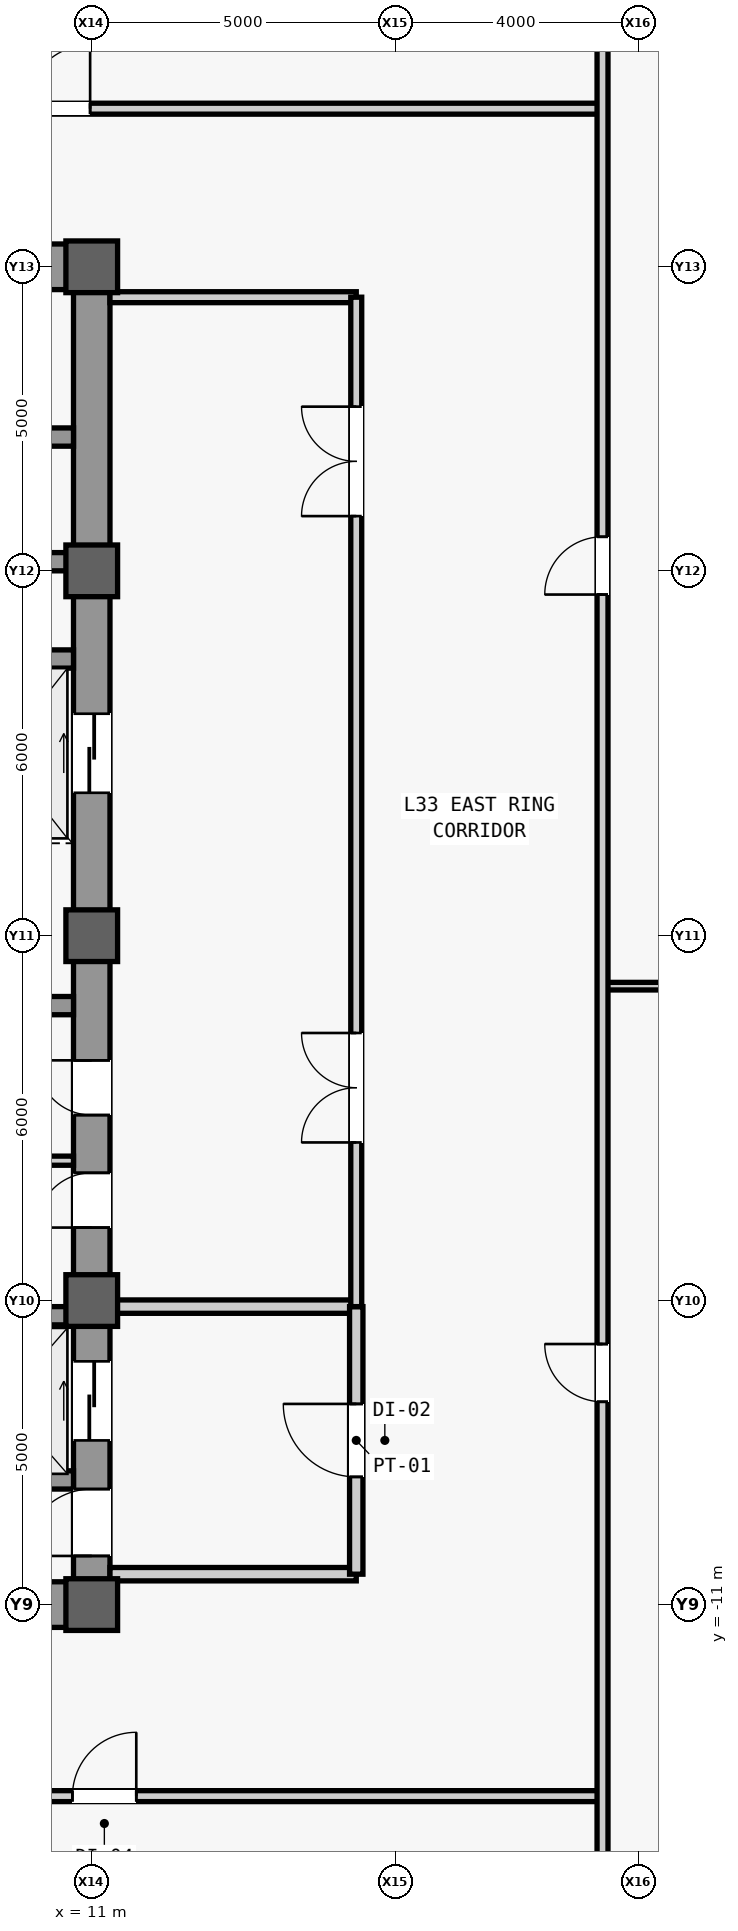
"""IFC4 building model, lengths in metres.
Left out: names, types, materials, properties, quantities, classifications, styles, units other than length and angle.
Written with IfcOpenShell. Run it as: python <this file> out.ifc"""

import sys

from ifc_helpers import new_model, si_unit, direction, frame, frame_2d, origin, origin_2d, place, context, subcontext, project, spatial, rectangle, extrude, source, transform, mapped, element, fill, save


model = new_model("IFC4")
c1 = context("Model", 3, precision=1e-05, world=origin(), true_north=direction((0.0, 1.0)))
c2 = subcontext(c1, "Body", "Model", "MODEL_VIEW")
j1 = project(units=[si_unit("LENGTHUNIT", "METRE"), si_unit("PLANEANGLEUNIT", "RADIAN")], contexts=[c1])
p1 = place(None, origin())
s1 = spatial("IfcSite", under=j1, at=p1, CompositionType="ELEMENT")
p2 = place(p1, origin())
s2 = spatial("IfcBuilding", under=s1, at=p2, CompositionType="ELEMENT")
p3 = place(p2, frame((0.0, 0.0, 144.7)))
s3 = spatial("IfcBuildingStorey", under=s2, at=p3, CompositionType="ELEMENT", Elevation=144.7)
m1 = source(origin(), c2, "Body", "SweptSolid", [
    extrude(rectangle(XDim=22.0, YDim=0.6, at=frame_2d((11.0, 0.0))), origin(), (0.0, 0.0, 1.0), 4.6),
])
p4 = place(p3, frame((11.0, -11.0, 0.0), z_axis=(0.0, 0.0, 1.0), x_axis=(0.0, 1.0, 0.0)))
e1 = element("IfcWall", 1, at=p4, inside=s3, PredefinedType="SHEAR", context=c2, shape_type="MappedRepresentation", body=[
    mapped(m1, transform((0.0, 0.0, 0.0), scale=1.0)),
])
m2 = source(origin(), c2, "Body", "SweptSolid", [
    extrude(rectangle(XDim=1.1, YDim=2.2, at=frame_2d((0.55, 1.1))), frame((0.0, 0.31, 0.0), z_axis=(0.0, -1.0, 0.0), x_axis=(1.0, 0.0, 0.0)), (0.0, 0.0, 1.0), 0.62),
])
p5 = place(p4, frame((0.8, 0.0, 0.0)))
e2 = element("IfcOpeningElement", 2, at=p5, cuts=e1, PredefinedType="OPENING", context=c2, shape_type="MappedRepresentation", body=[
    mapped(m2, transform((0.0, 0.0, 0.0), scale=1.0)),
])
m3 = source(origin(), c2, "Body", "SweptSolid", [
    extrude(rectangle(XDim=0.9, YDim=2.15, at=frame_2d((0.45, 1.075))), frame((0.0, 0.31, 0.0), z_axis=(0.0, -1.0, 0.0), x_axis=(1.0, 0.0, 0.0)), (0.0, 0.0, 1.0), 0.62),
])
p6 = place(p4, frame((6.2, 0.0, 0.0)))
e3 = element("IfcOpeningElement", 3, at=p6, cuts=e1, PredefinedType="OPENING", context=c2, shape_type="MappedRepresentation", body=[
    mapped(m3, transform((0.0, 0.0, 0.0), scale=1.0)),
])
p7 = place(p4, frame((8.05, 0.0, 0.0)))
e4 = element("IfcOpeningElement", 4, at=p7, cuts=e1, PredefinedType="OPENING", context=c2, shape_type="MappedRepresentation", body=[
    mapped(m3, transform((0.0, 0.0, 0.0), scale=1.0)),
])
m4 = source(origin(), c2, "Body", "SweptSolid", [
    extrude(rectangle(XDim=1.3, YDim=2.3, at=frame_2d((0.65, 1.15))), frame((0.0, 0.31, 0.0), z_axis=(0.0, -1.0, 0.0), x_axis=(1.0, 0.0, 0.0)), (0.0, 0.0, 1.0), 0.62),
])
p8 = place(p4, frame((2.7, 0.0, 0.0)))
e5 = element("IfcOpeningElement", 5, at=p8, cuts=e1, PredefinedType="OPENING", context=c2, shape_type="MappedRepresentation", body=[
    mapped(m4, transform((0.0, 0.0, 0.0), scale=1.0)),
])
p9 = place(p4, frame((13.35, 0.0, 0.0)))
e6 = element("IfcOpeningElement", 6, at=p9, cuts=e1, PredefinedType="OPENING", context=c2, shape_type="MappedRepresentation", body=[
    mapped(m4, transform((0.0, 0.0, 0.0), scale=1.0)),
])
m5 = source(origin(), c2, "Body", "SweptSolid", [
    extrude(rectangle(XDim=5.85, YDim=0.75, at=frame_2d((2.925, 0.0))), origin(), (0.0, 0.0, 1.0), 4.6),
])
p10 = place(p3, frame((4.85, -11.0, 0.0), z_axis=(0.0, 0.0, 1.0), x_axis=(1.0, 0.0, 0.0)))
e7 = element("IfcWall", 7, at=p10, inside=s3, PredefinedType="SHEAR", context=c2, shape_type="MappedRepresentation", body=[
    mapped(m5, transform((0.0, 0.0, 0.0), scale=1.0)),
])
p11 = place(p3, frame((4.85, 11.0, 0.0), z_axis=(0.0, 0.0, 1.0), x_axis=(1.0, 0.0, 0.0)))
e8 = element("IfcWall", 8, at=p11, inside=s3, PredefinedType="SHEAR", context=c2, shape_type="MappedRepresentation", body=[
    mapped(m5, transform((0.0, 0.0, 0.0), scale=1.0)),
])
m6 = source(origin(), c2, "Body", "SweptSolid", [
    extrude(rectangle(XDim=1.05, YDim=2.2, at=frame_2d((0.525, 1.1))), frame((0.0, 0.385, 0.0), z_axis=(0.0, -1.0, 0.0), x_axis=(1.0, 0.0, 0.0)), (0.0, 0.0, 1.0), 0.77),
])
p12 = place(p11, frame((1.375, 0.0, 0.0)))
e9 = element("IfcOpeningElement", 9, at=p12, cuts=e8, PredefinedType="OPENING", context=c2, shape_type="MappedRepresentation", body=[
    mapped(m6, transform((0.0, 0.0, 0.0), scale=1.0)),
])
m7 = source(origin(), c2, "Body", "SweptSolid", [
    extrude(rectangle(XDim=5.6, YDim=0.3, at=frame_2d((2.8, 0.0))), origin(), (0.0, 0.0, 1.0), 4.6),
])
p13 = place(p3, frame((5.1, -1.15, 0.0), z_axis=(0.0, 0.0, 1.0), x_axis=(1.0, 0.0, 0.0)))
e10 = element("IfcWall", 10, at=p13, inside=s3, PredefinedType="SHEAR", context=c2, shape_type="MappedRepresentation", body=[
    mapped(m7, transform((0.0, 0.0, 0.0), scale=1.0)),
])
m8 = source(origin(), c2, "Body", "SweptSolid", [
    extrude(rectangle(XDim=0.85, YDim=0.85, at=origin_2d()), origin(), (0.0, 0.0, 1.0), 5.2),
])
for number, where, z_axis, x_axis in (
    (11, (11.0, -11.0, 0.0), (0.0, 0.0, 1.0), (1.0, 0.0, 0.0)),
    (12, (11.0, -6.0, 0.0), (0.0, 0.0, 1.0), (1.0, 0.0, 0.0)),
    (13, (11.0, 0.0, 0.0), (0.0, 0.0, 1.0), (1.0, 0.0, 0.0)),
    (14, (11.0, 6.0, 0.0), (0.0, 0.0, 1.0), (1.0, 0.0, 0.0)),
    (15, (11.0, 11.0, 0.0), (0.0, 0.0, 1.0), (1.0, 0.0, 0.0)),
):
    element("IfcColumn", number, at=place(p3, frame(where, z_axis=z_axis, x_axis=x_axis)), inside=s3, PredefinedType="COLUMN", context=c2, shape_type="MappedRepresentation", body=[
        mapped(m8, transform((0.0, 0.0, 0.0), scale=1.0)),
    ])
m9 = source(origin(), c2, "Body", "SweptSolid", [
    extrude(rectangle(XDim=2.2, YDim=0.3, at=frame_2d((1.1, 0.0))), origin(), (0.0, 0.0, 1.0), 4.6),
])
for number, where, z_axis, x_axis in (
    (16, (8.5, -8.95, 0.0), (0.0, 0.0, 1.0), (1.0, 0.0, 0.0)),
    (17, (8.5, -6.25, 0.0), (0.0, 0.0, 1.0), (1.0, 0.0, 0.0)),
):
    element("IfcWall", number, at=place(p3, frame(where, z_axis=z_axis, x_axis=x_axis)), inside=s3, PredefinedType="SHEAR", context=c2, shape_type="MappedRepresentation", body=[
        mapped(m9, transform((0.0, 0.0, 0.0), scale=1.0)),
    ])
m10 = source(origin(), c2, "Body", "SweptSolid", [
    extrude(rectangle(XDim=2.3, YDim=0.3, at=frame_2d((1.15, 0.0))), origin(), (0.0, 0.0, 1.0), 4.6),
])
for number, where, z_axis, x_axis in (
    (18, (8.4, 4.55, 0.0), (0.0, 0.0, 1.0), (1.0, 0.0, 0.0)),
    (19, (8.4, 6.15, 0.0), (0.0, 0.0, 1.0), (1.0, 0.0, 0.0)),
    (20, (8.4, 8.2, 0.0), (0.0, 0.0, 1.0), (1.0, 0.0, 0.0)),
):
    element("IfcWall", number, at=place(p3, frame(where, z_axis=z_axis, x_axis=x_axis)), inside=s3, PredefinedType="SHEAR", context=c2, shape_type="MappedRepresentation", body=[
        mapped(m10, transform((0.0, 0.0, 0.0), scale=1.0)),
    ])
m11 = source(origin(), c2, "Body", "SweptSolid", [
    extrude(rectangle(XDim=2.05, YDim=0.15, at=frame_2d((1.025, 0.0))), origin(), (0.0, 0.0, 1.0), 4.6),
])
p14 = place(p3, frame((8.65, -3.7, 0.0), z_axis=(0.0, 0.0, 1.0), x_axis=(1.0, 0.0, 0.0)))
e21 = element("IfcWall", 21, at=p14, inside=s3, PredefinedType="PARTITIONING", context=c2, shape_type="MappedRepresentation", body=[
    mapped(m11, transform((0.0, 0.0, 0.0), scale=1.0)),
])
m12 = source(origin(), c2, "Body", "SweptSolid", [
    extrude(rectangle(XDim=4.05, YDim=0.22, at=frame_2d((2.025, 0.0))), origin(), (0.0, 0.0, 1.0), 4.6),
])
p15 = place(p3, frame((11.3, -10.5, 0.0), z_axis=(0.0, 0.0, 1.0), x_axis=(1.0, 0.0, 0.0)))
e22 = element("IfcWall", 22, at=p15, inside=s3, PredefinedType="PARTITIONING", context=c2, shape_type="MappedRepresentation", body=[
    mapped(m12, transform((0.0, 0.0, 0.0), scale=1.0)),
])
m13 = source(origin(), c2, "Body", "SweptSolid", [
    extrude(rectangle(XDim=4.05, YDim=0.22, at=frame_2d((2.025, 0.0))), origin(), (0.0, 0.0, 1.0), 2.8),
])
p16 = place(p3, frame((11.3, -6.1, 0.0), z_axis=(0.0, 0.0, 1.0), x_axis=(1.0, 0.0, 0.0)))
e23 = element("IfcWall", 23, at=p16, inside=s3, PredefinedType="PARTITIONING", context=c2, shape_type="MappedRepresentation", body=[
    mapped(m13, transform((0.0, 0.0, 0.0), scale=1.0)),
])
m14 = source(origin(), c2, "Body", "SweptSolid", [
    extrude(rectangle(XDim=4.4, YDim=0.22, at=frame_2d((2.2, 0.0))), origin(), (0.0, 0.0, 1.0), 4.6),
])
p17 = place(p3, frame((15.35, -10.5, 0.0), z_axis=(0.0, 0.0, 1.0), x_axis=(0.0, 1.0, 0.0)))
e24 = element("IfcWall", 24, at=p17, inside=s3, PredefinedType="PARTITIONING", context=c2, shape_type="MappedRepresentation", body=[
    mapped(m14, transform((0.0, 0.0, 0.0), scale=1.0)),
])
m15 = source(origin(), c2, "Body", "SweptSolid", [
    extrude(rectangle(XDim=1.2, YDim=2.2, at=frame_2d((0.6, 1.1))), frame((0.0, 0.12, 0.0), z_axis=(0.0, -1.0, 0.0), x_axis=(1.0, 0.0, 0.0)), (0.0, 0.0, 1.0), 0.24),
])
p18 = place(p17, frame((1.6, 0.0, 0.0)))
e25 = element("IfcOpeningElement", 25, at=p18, cuts=e24, PredefinedType="OPENING", context=c2, shape_type="MappedRepresentation", body=[
    mapped(m15, transform((0.0, 0.0, 0.0), scale=1.0)),
])
m16 = source(origin(), c2, "Body", "SweptSolid", [
    extrude(rectangle(XDim=4.05, YDim=0.18, at=frame_2d((2.025, 0.0))), origin(), (0.0, 0.0, 1.0), 4.6),
])
p19 = place(p3, frame((11.3, 10.5, 0.0), z_axis=(0.0, 0.0, 1.0), x_axis=(1.0, 0.0, 0.0)))
e26 = element("IfcWall", 26, at=p19, inside=s3, PredefinedType="PARTITIONING", context=c2, shape_type="MappedRepresentation", body=[
    mapped(m16, transform((0.0, 0.0, 0.0), scale=1.0)),
])
m17 = source(origin(), c2, "Body", "SweptSolid", [
    extrude(rectangle(XDim=16.6, YDim=0.18, at=frame_2d((8.3, 0.0))), origin(), (0.0, 0.0, 1.0), 4.6),
])
p20 = place(p3, frame((15.35, -6.1, 0.0), z_axis=(0.0, 0.0, 1.0), x_axis=(0.0, 1.0, 0.0)))
e27 = element("IfcWall", 27, at=p20, inside=s3, PredefinedType="PARTITIONING", context=c2, shape_type="MappedRepresentation", body=[
    mapped(m17, transform((0.0, 0.0, 0.0), scale=1.0)),
])
m18 = source(origin(), c2, "Body", "SweptSolid", [
    extrude(rectangle(XDim=1.8, YDim=2.25, at=frame_2d((0.9, 1.125))), frame((0.0, 0.1, 0.0), z_axis=(0.0, -1.0, 0.0), x_axis=(1.0, 0.0, 0.0)), (0.0, 0.0, 1.0), 0.2),
])
p21 = place(p20, frame((2.7, 0.0, 0.0)))
e28 = element("IfcOpeningElement", 28, at=p21, cuts=e27, PredefinedType="OPENING", context=c2, shape_type="MappedRepresentation", body=[
    mapped(m18, transform((0.0, 0.0, 0.0), scale=1.0)),
])
p22 = place(p20, frame((13.0, 0.0, 0.0)))
e29 = element("IfcOpeningElement", 29, at=p22, cuts=e27, PredefinedType="OPENING", context=c2, shape_type="MappedRepresentation", body=[
    mapped(m18, transform((0.0, 0.0, 0.0), scale=1.0)),
])
m19 = source(origin(), c2, "Body", "SweptSolid", [
    extrude(rectangle(XDim=37.95, YDim=0.18, at=frame_2d((18.975, 0.0))), origin(), (0.0, 0.0, 1.0), 4.6),
])
p23 = place(p3, frame((-18.55, -14.15, 0.0), z_axis=(0.0, 0.0, 1.0), x_axis=(1.0, 0.0, 0.0)))
e30 = element("IfcWall", 30, at=p23, inside=s3, PredefinedType="PARTITIONING", context=c2, shape_type="MappedRepresentation", body=[
    mapped(m19, transform((0.0, 0.0, 0.0), scale=1.0)),
])
m20 = source(origin(), c2, "Body", "SweptSolid", [
    extrude(rectangle(XDim=1.05, YDim=2.2, at=frame_2d((0.525, 1.1))), frame((0.0, 0.1, 0.0), z_axis=(0.0, -1.0, 0.0), x_axis=(1.0, 0.0, 0.0)), (0.0, 0.0, 1.0), 0.2),
])
p24 = place(p23, frame((8.191, 0.0, 0.0)))
e31 = element("IfcOpeningElement", 31, at=p24, cuts=e30, PredefinedType="OPENING", context=c2, shape_type="MappedRepresentation", body=[
    mapped(m20, transform((0.0, 0.0, 0.0), scale=1.0)),
])
p25 = place(p23, frame((19.399, 0.0, 0.0)))
e32 = element("IfcOpeningElement", 32, at=p25, cuts=e30, PredefinedType="OPENING", context=c2, shape_type="MappedRepresentation", body=[
    mapped(m20, transform((0.0, 0.0, 0.0), scale=1.0)),
])
p26 = place(p23, frame((29.232, 0.0, 0.0)))
e33 = element("IfcOpeningElement", 33, at=p26, cuts=e30, PredefinedType="OPENING", context=c2, shape_type="MappedRepresentation", body=[
    mapped(m20, transform((0.0, 0.0, 0.0), scale=1.0)),
])
p27 = place(p3, frame((-18.55, 13.6, 0.0), z_axis=(0.0, 0.0, 1.0), x_axis=(1.0, 0.0, 0.0)))
e34 = element("IfcWall", 34, at=p27, inside=s3, PredefinedType="PARTITIONING", context=c2, shape_type="MappedRepresentation", body=[
    mapped(m19, transform((0.0, 0.0, 0.0), scale=1.0)),
])
p28 = place(p27, frame((7.622, 0.0, 0.0)))
e35 = element("IfcOpeningElement", 35, at=p28, cuts=e34, PredefinedType="OPENING", context=c2, shape_type="MappedRepresentation", body=[
    mapped(m20, transform((0.0, 0.0, 0.0), scale=1.0)),
])
p29 = place(p27, frame((18.071, 0.0, 0.0)))
e36 = element("IfcOpeningElement", 36, at=p29, cuts=e34, PredefinedType="OPENING", context=c2, shape_type="MappedRepresentation", body=[
    mapped(m20, transform((0.0, 0.0, 0.0), scale=1.0)),
])
p30 = place(p27, frame((28.473, 0.0, 0.0)))
e37 = element("IfcOpeningElement", 37, at=p30, cuts=e34, PredefinedType="OPENING", context=c2, shape_type="MappedRepresentation", body=[
    mapped(m20, transform((0.0, 0.0, 0.0), scale=1.0)),
])
m21 = source(origin(), c2, "Body", "SweptSolid", [
    extrude(rectangle(XDim=12.6, YDim=0.125, at=frame_2d((6.3, 0.0))), origin(), (0.0, 0.0, 1.0), 4.6),
])
p31 = place(p3, frame((19.4, -0.83, 0.0), z_axis=(0.0, 0.0, 1.0), x_axis=(1.0, 0.0, 0.0)))
e38 = element("IfcWall", 38, at=p31, inside=s3, PredefinedType="PARTITIONING", context=c2, shape_type="MappedRepresentation", body=[
    mapped(m21, transform((0.0, 0.0, 0.0), scale=1.0)),
])
m22 = source(origin(), c2, "Body", "SweptSolid", [
    extrude(rectangle(XDim=56.0, YDim=0.18, at=frame_2d((28.0, 0.0))), origin(), (0.0, 0.0, 1.0), 4.131),
])
p32 = place(p3, frame((19.4, -28.0, 0.0), z_axis=(0.0, 0.0, 1.0), x_axis=(0.0, 1.0, 0.0)))
e39 = element("IfcWall", 39, at=p32, inside=s3, PredefinedType="PARTITIONING", context=c2, shape_type="MappedRepresentation", body=[
    mapped(m22, transform((0.0, 0.0, 0.0), scale=1.0)),
])
m23 = source(origin(), c2, "Body", "SweptSolid", [
    extrude(rectangle(XDim=0.95, YDim=2.15, at=frame_2d((0.475, 1.075))), frame((0.0, 0.1, 0.0), z_axis=(0.0, -1.0, 0.0), x_axis=(1.0, 0.0, 0.0)), (0.0, 0.0, 1.0), 0.2),
])
p33 = place(p32, frame((20.335, 0.0, 0.0)))
e40 = element("IfcOpeningElement", 40, at=p33, cuts=e39, PredefinedType="OPENING", context=c2, shape_type="MappedRepresentation", body=[
    mapped(m23, transform((0.0, 0.0, 0.0), scale=1.0)),
])
p34 = place(p32, frame((33.61, 0.0, 0.0)))
e41 = element("IfcOpeningElement", 41, at=p34, cuts=e39, PredefinedType="OPENING", context=c2, shape_type="MappedRepresentation", body=[
    mapped(m23, transform((0.0, 0.0, 0.0), scale=1.0)),
])
m24 = source(origin(), c2, "Body", "SweptSolid", [
    extrude(rectangle(XDim=1.1, YDim=2.2, at=frame_2d((0.55, 1.1))), frame((0.0, 0.025, 0.0), z_axis=(0.0, -1.0, 0.0), x_axis=(1.0, 0.0, 0.0)), (0.0, 0.0, 1.0), 0.05),
])
p35 = place(p5, origin())
e42 = element("IfcDoor", 42, at=p35, inside=s3, OperationType="SINGLE_SWING_LEFT", PredefinedType="DOOR", context=c2, shape_type="MappedRepresentation", body=[
    mapped(m24, transform((0.0, 0.0, 0.0), scale=1.0)),
])
fill(e2, e42)
m25 = source(origin(), c2, "Body", "SweptSolid", [
    extrude(rectangle(XDim=0.9, YDim=2.15, at=frame_2d((0.45, 1.075))), frame((0.0, 0.025, 0.0), z_axis=(0.0, -1.0, 0.0), x_axis=(1.0, 0.0, 0.0)), (0.0, 0.0, 1.0), 0.05),
])
p36 = place(p6, origin())
e43 = element("IfcDoor", 43, at=p36, inside=s3, OperationType="SINGLE_SWING_LEFT", PredefinedType="DOOR", context=c2, shape_type="MappedRepresentation", body=[
    mapped(m25, transform((0.0, 0.0, 0.0), scale=1.0)),
])
fill(e3, e43)
p37 = place(p7, origin())
e44 = element("IfcDoor", 44, at=p37, inside=s3, OperationType="SINGLE_SWING_RIGHT", PredefinedType="DOOR", context=c2, shape_type="MappedRepresentation", body=[
    mapped(m25, transform((0.0, 0.0, 0.0), scale=1.0)),
])
fill(e4, e44)
m26 = source(origin(), c2, "Body", "SweptSolid", [
    extrude(rectangle(XDim=1.2, YDim=2.2, at=frame_2d((0.6, 1.1))), frame((0.0, 0.025, 0.0), z_axis=(0.0, -1.0, 0.0), x_axis=(1.0, 0.0, 0.0)), (0.0, 0.0, 1.0), 0.05),
])
p38 = place(p18, origin())
e45 = element("IfcDoor", 45, at=p38, inside=s3, OperationType="SINGLE_SWING_RIGHT", PredefinedType="DOOR", context=c2, shape_type="MappedRepresentation", body=[
    mapped(m26, transform((0.0, 0.0, 0.0), scale=1.0)),
])
fill(e25, e45)
m27 = source(origin(), c2, "Body", "SweptSolid", [
    extrude(rectangle(XDim=1.8, YDim=2.25, at=frame_2d((0.9, 1.125))), frame((0.0, 0.025, 0.0), z_axis=(0.0, -1.0, 0.0), x_axis=(1.0, 0.0, 0.0)), (0.0, 0.0, 1.0), 0.05),
])
p39 = place(p21, origin())
e46 = element("IfcDoor", 46, at=p39, inside=s3, OperationType="SINGLE_SWING_RIGHT", PredefinedType="DOOR", context=c2, shape_type="MappedRepresentation", body=[
    mapped(m27, transform((0.0, 0.0, 0.0), scale=1.0)),
])
fill(e28, e46)
p40 = place(p22, origin())
e47 = element("IfcDoor", 47, at=p40, inside=s3, OperationType="SINGLE_SWING_LEFT", PredefinedType="DOOR", context=c2, shape_type="MappedRepresentation", body=[
    mapped(m27, transform((0.0, 0.0, 0.0), scale=1.0)),
])
fill(e29, e47)
m28 = source(origin(), c2, "Body", "SweptSolid", [
    extrude(rectangle(XDim=1.05, YDim=2.2, at=frame_2d((0.525, 1.1))), frame((0.0, 0.025, 0.0), z_axis=(0.0, -1.0, 0.0), x_axis=(1.0, 0.0, 0.0)), (0.0, 0.0, 1.0), 0.05),
])
p41 = place(p26, origin())
e48 = element("IfcDoor", 48, at=p41, inside=s3, OperationType="SINGLE_SWING_RIGHT", PredefinedType="DOOR", context=c2, shape_type="MappedRepresentation", body=[
    mapped(m28, transform((0.0, 0.0, 0.0), scale=1.0)),
])
fill(e33, e48)
p42 = place(p30, origin())
e49 = element("IfcDoor", 49, at=p42, inside=s3, OperationType="SINGLE_SWING_RIGHT", PredefinedType="DOOR", context=c2, shape_type="MappedRepresentation", body=[
    mapped(m28, transform((0.0, 0.0, 0.0), scale=1.0)),
])
fill(e37, e49)
m29 = source(origin(), c2, "Body", "SweptSolid", [
    extrude(rectangle(XDim=0.95, YDim=2.15, at=frame_2d((0.475, 1.075))), frame((0.0, 0.025, 0.0), z_axis=(0.0, -1.0, 0.0), x_axis=(1.0, 0.0, 0.0)), (0.0, 0.0, 1.0), 0.05),
])
p43 = place(p33, origin())
e50 = element("IfcDoor", 50, at=p43, inside=s3, OperationType="SINGLE_SWING_RIGHT", PredefinedType="DOOR", context=c2, shape_type="MappedRepresentation", body=[
    mapped(m29, transform((0.0, 0.0, 0.0), scale=1.0)),
])
fill(e40, e50)
p44 = place(p34, origin())
e51 = element("IfcDoor", 51, at=p44, inside=s3, OperationType="SINGLE_SWING_LEFT", PredefinedType="DOOR", context=c2, shape_type="MappedRepresentation", body=[
    mapped(m29, transform((0.0, 0.0, 0.0), scale=1.0)),
])
fill(e41, e51)
m30 = source(origin(), c2, "Body", "SweptSolid", [
    extrude(rectangle(XDim=1.3, YDim=2.3, at=frame_2d((0.65, 1.15))), frame((0.0, 0.025, 0.0), z_axis=(0.0, -1.0, 0.0), x_axis=(1.0, 0.0, 0.0)), (0.0, 0.0, 1.0), 0.05),
])
p45 = place(p8, origin())
e52 = element("IfcDoor", 52, at=p45, inside=s3, OperationType="SLIDING_TO_LEFT", PredefinedType="DOOR", context=c2, shape_type="MappedRepresentation", body=[
    mapped(m30, transform((0.0, 0.0, 0.0), scale=1.0)),
])
fill(e5, e52)
p46 = place(p9, origin())
e53 = element("IfcDoor", 53, at=p46, inside=s3, OperationType="SLIDING_TO_LEFT", PredefinedType="DOOR", context=c2, shape_type="MappedRepresentation", body=[
    mapped(m30, transform((0.0, 0.0, 0.0), scale=1.0)),
])
fill(e6, e53)
save(model, sys.argv[1])
